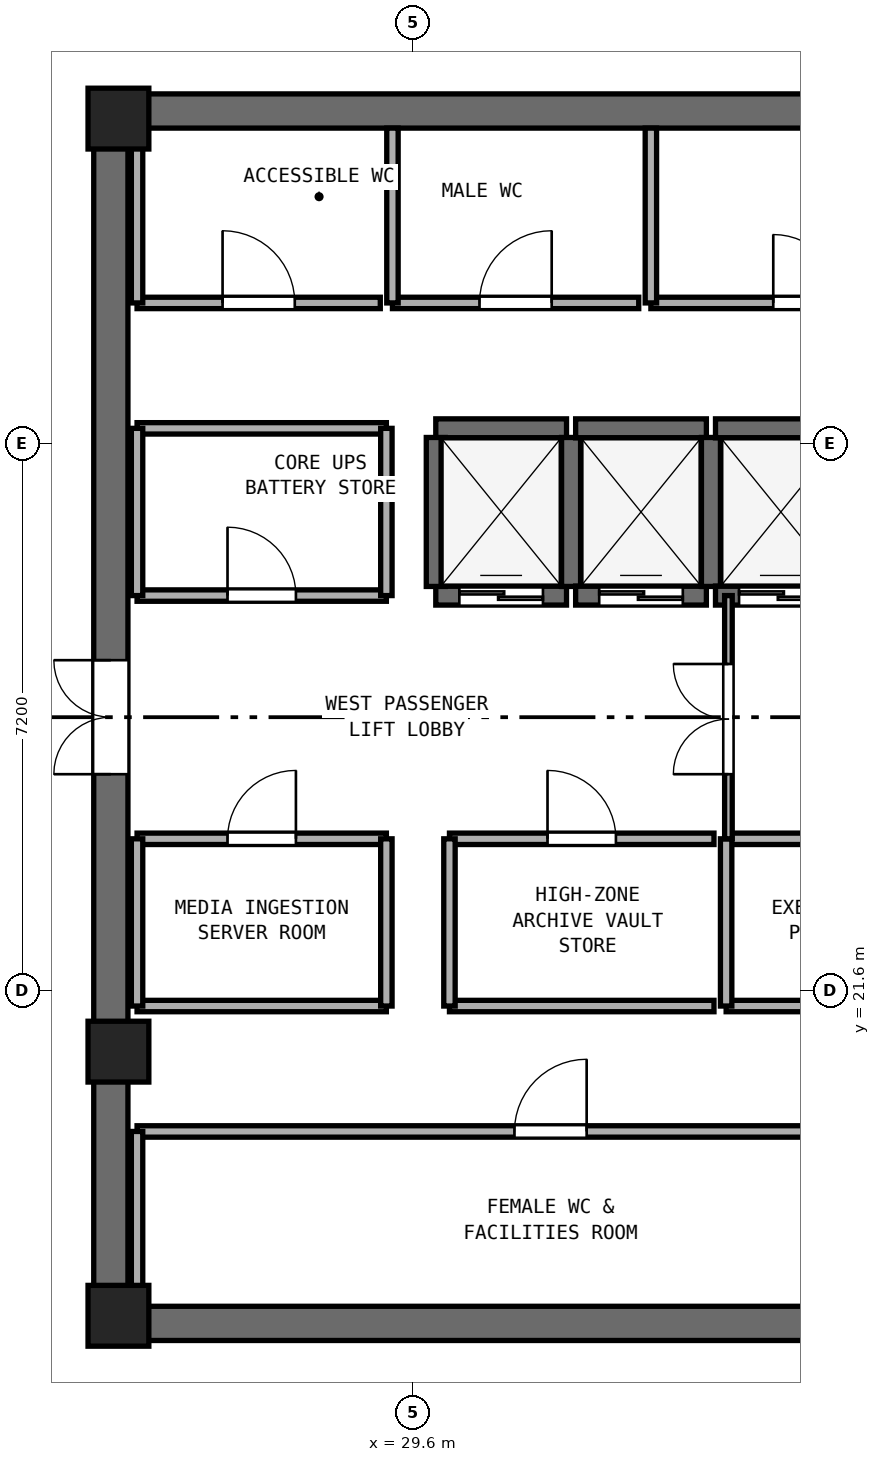
"""IFC4 building model, lengths in metres.
Left out: names, types, materials, properties, quantities, classifications, styles, units other than length and angle.
Written with IfcOpenShell. Run it as: python <this file> out.ifc"""

import sys

from ifc_helpers import new_model, si_unit, direction, frame, frame_2d, origin, origin_2d, place, context, subcontext, project, spatial, rectangle, extrude, element, fill, save


model = new_model("IFC4")
c1 = context("Model", 3, precision=1e-05, world=origin(), true_north=direction((0.0, 1.0)))
c2 = subcontext(c1, "Body", "Model", "MODEL_VIEW")
j1 = project(units=[si_unit("LENGTHUNIT", "METRE"), si_unit("PLANEANGLEUNIT", "RADIAN")], contexts=[c1])
p1 = place(None, origin())
s1 = spatial("IfcSite", under=j1, at=p1, CompositionType="ELEMENT")
p2 = place(p1, origin())
s2 = spatial("IfcBuilding", under=s1, at=p2, CompositionType="ELEMENT")
p3 = place(p2, frame((0.0, 0.0, 251.6)))
s3 = spatial("IfcBuildingStorey", under=s2, at=p3, CompositionType="ELEMENT", Elevation=251.6)
for number, where, z_axis, x_axis in (
    (1, (25.4, 17.225, 0.0), (0.0, 0.0, 1.0), (1.0, 0.0, 0.0)),
    (2, (25.4, 33.175, 0.0), (0.0, 0.0, 1.0), (1.0, 0.0, 0.0)),
):
    element("IfcWall", number, at=place(p3, frame(where, z_axis=z_axis, x_axis=x_axis)), inside=s3, PredefinedType="SHEAR", context=c2, shape_type="SweptSolid", body=[
        extrude(rectangle(XDim=23.2, YDim=0.45, at=frame_2d((11.6, 0.0))), origin(), (0.0, 0.0, 1.0), 3.51),
    ])
p4 = place(p3, frame((25.625, 17.45, 0.0), z_axis=(0.0, 0.0, 1.0), x_axis=(0.0, 1.0, 0.0)))
e3 = element("IfcWall", 3, at=p4, inside=s3, PredefinedType="SHEAR", context=c2, shape_type="SweptSolid", body=[
    extrude(rectangle(XDim=15.5, YDim=0.45, at=frame_2d((7.75, 0.0))), origin(), (0.0, 0.0, 1.0), 3.51),
])
p5 = place(p4, frame((7.0, 0.0, 0.0)))
e4 = element("IfcOpeningElement", 4, at=p5, cuts=e3, PredefinedType="OPENING", context=c2, shape_type="SweptSolid", body=[
    extrude(rectangle(XDim=1.5, YDim=2.15, at=frame_2d((0.75, 1.075))), frame((0.0, 0.235, 0.0), z_axis=(0.0, -1.0, 0.0), x_axis=(1.0, 0.0, 0.0)), (0.0, 0.0, 1.0), 0.47),
])
for number, where, z_axis, x_axis in (
    (5, (25.725, 17.325, 0.0), (0.0, 0.0, 1.0), (1.0, 0.0, 0.0)),
    (6, (25.725, 33.075, 0.0), (0.0, 0.0, 1.0), (1.0, 0.0, 0.0)),
    (7, (25.725, 20.8, 0.0), (0.0, 0.0, 1.0), (1.0, 0.0, 0.0)),
):
    element("IfcColumn", number, at=place(p3, frame(where, z_axis=z_axis, x_axis=x_axis)), inside=s3, PredefinedType="PILASTER", context=c2, shape_type="SweptSolid", body=[
        extrude(rectangle(XDim=0.8, YDim=0.8, at=origin_2d()), origin(), (0.0, 0.0, 1.0), 3.8),
    ])
p6 = place(p3, frame((29.9, 26.8, 0.0), z_axis=(0.0, 0.0, 1.0), x_axis=(1.0, 0.0, 0.0)))
e8 = element("IfcWall", 8, at=p6, inside=s3, PredefinedType="SHEAR", context=c2, shape_type="SweptSolid", body=[
    extrude(rectangle(XDim=1.72, YDim=0.25, at=frame_2d((0.86, 0.0))), origin(), (0.0, 0.0, 1.0), 3.51),
])
p7 = place(p6, frame((0.31, 0.0, 0.0)))
e9 = element("IfcOpeningElement", 9, at=p7, cuts=e8, PredefinedType="OPENING", context=c2, shape_type="SweptSolid", body=[
    extrude(rectangle(XDim=1.1, YDim=2.15, at=frame_2d((0.55, 1.075))), frame((0.0, 0.135, 0.0), z_axis=(0.0, -1.0, 0.0), x_axis=(1.0, 0.0, 0.0)), (0.0, 0.0, 1.0), 0.27),
])
p8 = place(p3, frame((29.9, 29.0, 0.0), z_axis=(0.0, 0.0, 1.0), x_axis=(1.0, 0.0, 0.0)))
e10 = element("IfcWall", 10, at=p8, inside=s3, PredefinedType="SHEAR", context=c2, shape_type="SweptSolid", body=[
    extrude(rectangle(XDim=1.72, YDim=0.25, at=frame_2d((0.86, 0.0))), origin(), (0.0, 0.0, 1.0), 3.51),
])
for number, where, z_axis, x_axis in (
    (11, (29.9, 26.92, 0.0), (0.0, 0.0, 1.0), (0.0, 1.0, 0.0)),
    (12, (31.68, 26.92, 0.0), (0.0, 0.0, 1.0), (0.0, 1.0, 0.0)),
):
    element("IfcWall", number, at=place(p3, frame(where, z_axis=z_axis, x_axis=x_axis)), inside=s3, PredefinedType="SHEAR", context=c2, shape_type="SweptSolid", body=[
        extrude(rectangle(XDim=1.96, YDim=0.25, at=frame_2d((0.98, 0.0))), origin(), (0.0, 0.0, 1.0), 3.51),
    ])
p9 = place(p3, frame((31.74, 26.8, 0.0), z_axis=(0.0, 0.0, 1.0), x_axis=(1.0, 0.0, 0.0)))
e13 = element("IfcWall", 13, at=p9, inside=s3, PredefinedType="SHEAR", context=c2, shape_type="SweptSolid", body=[
    extrude(rectangle(XDim=1.72, YDim=0.25, at=frame_2d((0.86, 0.0))), origin(), (0.0, 0.0, 1.0), 3.51),
])
p10 = place(p9, frame((0.31, 0.0, 0.0)))
e14 = element("IfcOpeningElement", 14, at=p10, cuts=e13, PredefinedType="OPENING", context=c2, shape_type="SweptSolid", body=[
    extrude(rectangle(XDim=1.1, YDim=2.15, at=frame_2d((0.55, 1.075))), frame((0.0, 0.135, 0.0), z_axis=(0.0, -1.0, 0.0), x_axis=(1.0, 0.0, 0.0)), (0.0, 0.0, 1.0), 0.27),
])
p11 = place(p3, frame((31.74, 29.0, 0.0), z_axis=(0.0, 0.0, 1.0), x_axis=(1.0, 0.0, 0.0)))
e15 = element("IfcWall", 15, at=p11, inside=s3, PredefinedType="SHEAR", context=c2, shape_type="SweptSolid", body=[
    extrude(rectangle(XDim=1.72, YDim=0.25, at=frame_2d((0.86, 0.0))), origin(), (0.0, 0.0, 1.0), 3.51),
])
p12 = place(p3, frame((33.52, 26.92, 0.0), z_axis=(0.0, 0.0, 1.0), x_axis=(0.0, 1.0, 0.0)))
e16 = element("IfcWall", 16, at=p12, inside=s3, PredefinedType="SHEAR", context=c2, shape_type="SweptSolid", body=[
    extrude(rectangle(XDim=1.96, YDim=0.25, at=frame_2d((0.98, 0.0))), origin(), (0.0, 0.0, 1.0), 3.51),
])
p13 = place(p3, frame((33.58, 26.8, 0.0), z_axis=(0.0, 0.0, 1.0), x_axis=(1.0, 0.0, 0.0)))
e17 = element("IfcWall", 17, at=p13, inside=s3, PredefinedType="SHEAR", context=c2, shape_type="SweptSolid", body=[
    extrude(rectangle(XDim=1.72, YDim=0.25, at=frame_2d((0.86, 0.0))), origin(), (0.0, 0.0, 1.0), 3.51),
])
p14 = place(p13, frame((0.31, 0.0, 0.0)))
e18 = element("IfcOpeningElement", 18, at=p14, cuts=e17, PredefinedType="OPENING", context=c2, shape_type="SweptSolid", body=[
    extrude(rectangle(XDim=1.1, YDim=2.15, at=frame_2d((0.55, 1.075))), frame((0.0, 0.135, 0.0), z_axis=(0.0, -1.0, 0.0), x_axis=(1.0, 0.0, 0.0)), (0.0, 0.0, 1.0), 0.27),
])
p15 = place(p3, frame((33.58, 29.0, 0.0), z_axis=(0.0, 0.0, 1.0), x_axis=(1.0, 0.0, 0.0)))
e19 = element("IfcWall", 19, at=p15, inside=s3, PredefinedType="SHEAR", context=c2, shape_type="SweptSolid", body=[
    extrude(rectangle(XDim=1.72, YDim=0.25, at=frame_2d((0.86, 0.0))), origin(), (0.0, 0.0, 1.0), 3.51),
])
p16 = place(p3, frame((25.97, 30.65, 0.0), z_axis=(0.0, 0.0, 1.0), x_axis=(1.0, 0.0, 0.0)))
e20 = element("IfcWall", 20, at=p16, inside=s3, PredefinedType="PARTITIONING", context=c2, shape_type="SweptSolid", body=[
    extrude(rectangle(XDim=3.2, YDim=0.15, at=frame_2d((1.6, 0.0))), origin(), (0.0, 0.0, 1.0), 3.51),
])
p17 = place(p16, frame((1.125, 0.0, 0.0)))
e21 = element("IfcOpeningElement", 21, at=p17, cuts=e20, PredefinedType="OPENING", context=c2, shape_type="SweptSolid", body=[
    extrude(rectangle(XDim=0.95, YDim=2.1, at=frame_2d((0.475, 1.05))), frame((0.0, 0.085, 0.0), z_axis=(0.0, -1.0, 0.0), x_axis=(1.0, 0.0, 0.0)), (0.0, 0.0, 1.0), 0.17),
])
p18 = place(p3, frame((25.97, 30.65, 0.0), z_axis=(0.0, 0.0, 1.0), x_axis=(0.0, 1.0, 0.0)))
e22 = element("IfcWall", 22, at=p18, inside=s3, PredefinedType="PARTITIONING", context=c2, shape_type="SweptSolid", body=[
    extrude(rectangle(XDim=2.3, YDim=0.15, at=frame_2d((1.15, 0.0))), origin(), (0.0, 0.0, 1.0), 2.61),
])
p19 = place(p3, frame((29.33, 30.65, 0.0), z_axis=(0.0, 0.0, 1.0), x_axis=(1.0, 0.0, 0.0)))
e23 = element("IfcWall", 23, at=p19, inside=s3, PredefinedType="PARTITIONING", context=c2, shape_type="SweptSolid", body=[
    extrude(rectangle(XDim=3.24, YDim=0.15, at=frame_2d((1.62, 0.0))), origin(), (0.0, 0.0, 1.0), 3.51),
])
p20 = place(p19, frame((1.145, 0.0, 0.0)))
e24 = element("IfcOpeningElement", 24, at=p20, cuts=e23, PredefinedType="OPENING", context=c2, shape_type="SweptSolid", body=[
    extrude(rectangle(XDim=0.95, YDim=2.1, at=frame_2d((0.475, 1.05))), frame((0.0, 0.085, 0.0), z_axis=(0.0, -1.0, 0.0), x_axis=(1.0, 0.0, 0.0)), (0.0, 0.0, 1.0), 0.17),
])
p21 = place(p3, frame((29.33, 30.65, 0.0), z_axis=(0.0, 0.0, 1.0), x_axis=(0.0, 1.0, 0.0)))
e25 = element("IfcWall", 25, at=p21, inside=s3, PredefinedType="PARTITIONING", context=c2, shape_type="SweptSolid", body=[
    extrude(rectangle(XDim=2.3, YDim=0.15, at=frame_2d((1.15, 0.0))), origin(), (0.0, 0.0, 1.0), 3.51),
])
p22 = place(p3, frame((32.73, 30.65, 0.0), z_axis=(0.0, 0.0, 1.0), x_axis=(1.0, 0.0, 0.0)))
e26 = element("IfcWall", 26, at=p22, inside=s3, PredefinedType="PARTITIONING", context=c2, shape_type="SweptSolid", body=[
    extrude(rectangle(XDim=4.12, YDim=0.15, at=frame_2d((2.06, 0.0))), origin(), (0.0, 0.0, 1.0), 3.51),
])
p23 = place(p22, frame((1.61, 0.0, 0.0)))
e27 = element("IfcOpeningElement", 27, at=p23, cuts=e26, PredefinedType="OPENING", context=c2, shape_type="SweptSolid", body=[
    extrude(rectangle(XDim=0.9, YDim=2.1, at=frame_2d((0.45, 1.05))), frame((0.0, 0.085, 0.0), z_axis=(0.0, -1.0, 0.0), x_axis=(1.0, 0.0, 0.0)), (0.0, 0.0, 1.0), 0.17),
])
p24 = place(p3, frame((32.73, 30.65, 0.0), z_axis=(0.0, 0.0, 1.0), x_axis=(0.0, 1.0, 0.0)))
e28 = element("IfcWall", 28, at=p24, inside=s3, PredefinedType="PARTITIONING", context=c2, shape_type="SweptSolid", body=[
    extrude(rectangle(XDim=2.3, YDim=0.15, at=frame_2d((1.15, 0.0))), origin(), (0.0, 0.0, 1.0), 3.51),
])
p25 = place(p3, frame((25.97, 19.75, 0.0), z_axis=(0.0, 0.0, 1.0), x_axis=(1.0, 0.0, 0.0)))
e29 = element("IfcWall", 29, at=p25, inside=s3, PredefinedType="PARTITIONING", context=c2, shape_type="SweptSolid", body=[
    extrude(rectangle(XDim=10.88, YDim=0.15, at=frame_2d((5.44, 0.0))), origin(), (0.0, 0.0, 1.0), 3.51),
])
p26 = place(p25, frame((4.965, 0.0, 0.0)))
e30 = element("IfcOpeningElement", 30, at=p26, cuts=e29, PredefinedType="OPENING", context=c2, shape_type="SweptSolid", body=[
    extrude(rectangle(XDim=0.95, YDim=2.1, at=frame_2d((0.475, 1.05))), frame((0.0, 0.085, 0.0), z_axis=(0.0, -1.0, 0.0), x_axis=(1.0, 0.0, 0.0)), (0.0, 0.0, 1.0), 0.17),
])
p27 = place(p3, frame((25.97, 17.45, 0.0), z_axis=(0.0, 0.0, 1.0), x_axis=(0.0, 1.0, 0.0)))
e31 = element("IfcWall", 31, at=p27, inside=s3, PredefinedType="PARTITIONING", context=c2, shape_type="SweptSolid", body=[
    extrude(rectangle(XDim=2.3, YDim=0.15, at=frame_2d((1.15, 0.0))), origin(), (0.0, 0.0, 1.0), 2.61),
])
p28 = place(p3, frame((25.97, 26.8, 0.0), z_axis=(0.0, 0.0, 1.0), x_axis=(1.0, 0.0, 0.0)))
e32 = element("IfcWall", 32, at=p28, inside=s3, PredefinedType="PARTITIONING", context=c2, shape_type="SweptSolid", body=[
    extrude(rectangle(XDim=3.28, YDim=0.15, at=frame_2d((1.64, 0.0))), origin(), (0.0, 0.0, 1.0), 3.51),
])
p29 = place(p28, frame((1.19, 0.0, 0.0)))
e33 = element("IfcOpeningElement", 33, at=p29, cuts=e32, PredefinedType="OPENING", context=c2, shape_type="SweptSolid", body=[
    extrude(rectangle(XDim=0.9, YDim=2.1, at=frame_2d((0.45, 1.05))), frame((0.0, 0.085, 0.0), z_axis=(0.0, -1.0, 0.0), x_axis=(1.0, 0.0, 0.0)), (0.0, 0.0, 1.0), 0.17),
])
p30 = place(p3, frame((25.97, 29.0, 0.0), z_axis=(0.0, 0.0, 1.0), x_axis=(1.0, 0.0, 0.0)))
e34 = element("IfcWall", 34, at=p30, inside=s3, PredefinedType="PARTITIONING", context=c2, shape_type="SweptSolid", body=[
    extrude(rectangle(XDim=3.28, YDim=0.15, at=frame_2d((1.64, 0.0))), origin(), (0.0, 0.0, 1.0), 3.51),
])
p31 = place(p3, frame((25.97, 26.8, 0.0), z_axis=(0.0, 0.0, 1.0), x_axis=(0.0, 1.0, 0.0)))
e35 = element("IfcWall", 35, at=p31, inside=s3, PredefinedType="PARTITIONING", context=c2, shape_type="SweptSolid", body=[
    extrude(rectangle(XDim=2.2, YDim=0.15, at=frame_2d((1.1, 0.0))), origin(), (0.0, 0.0, 1.0), 2.61),
])
p32 = place(p3, frame((29.25, 26.8, 0.0), z_axis=(0.0, 0.0, 1.0), x_axis=(0.0, 1.0, 0.0)))
e36 = element("IfcWall", 36, at=p32, inside=s3, PredefinedType="PARTITIONING", context=c2, shape_type="SweptSolid", body=[
    extrude(rectangle(XDim=2.2, YDim=0.15, at=frame_2d((1.1, 0.0))), origin(), (0.0, 0.0, 1.0), 3.51),
])
p33 = place(p3, frame((25.97, 21.4, 0.0), z_axis=(0.0, 0.0, 1.0), x_axis=(1.0, 0.0, 0.0)))
e37 = element("IfcWall", 37, at=p33, inside=s3, PredefinedType="PARTITIONING", context=c2, shape_type="SweptSolid", body=[
    extrude(rectangle(XDim=3.28, YDim=0.15, at=frame_2d((1.64, 0.0))), origin(), (0.0, 0.0, 1.0), 3.51),
])
p34 = place(p3, frame((25.97, 23.6, 0.0), z_axis=(0.0, 0.0, 1.0), x_axis=(1.0, 0.0, 0.0)))
e38 = element("IfcWall", 38, at=p34, inside=s3, PredefinedType="PARTITIONING", context=c2, shape_type="SweptSolid", body=[
    extrude(rectangle(XDim=3.28, YDim=0.15, at=frame_2d((1.64, 0.0))), origin(), (0.0, 0.0, 1.0), 3.51),
])
p35 = place(p34, frame((1.19, 0.0, 0.0)))
e39 = element("IfcOpeningElement", 39, at=p35, cuts=e38, PredefinedType="OPENING", context=c2, shape_type="SweptSolid", body=[
    extrude(rectangle(XDim=0.9, YDim=2.1, at=frame_2d((0.45, 1.05))), frame((0.0, 0.085, 0.0), z_axis=(0.0, -1.0, 0.0), x_axis=(1.0, 0.0, 0.0)), (0.0, 0.0, 1.0), 0.17),
])
p36 = place(p3, frame((25.97, 21.4, 0.0), z_axis=(0.0, 0.0, 1.0), x_axis=(0.0, 1.0, 0.0)))
e40 = element("IfcWall", 40, at=p36, inside=s3, PredefinedType="PARTITIONING", context=c2, shape_type="SweptSolid", body=[
    extrude(rectangle(XDim=2.2, YDim=0.15, at=frame_2d((1.1, 0.0))), origin(), (0.0, 0.0, 1.0), 2.61),
])
p37 = place(p3, frame((29.25, 21.4, 0.0), z_axis=(0.0, 0.0, 1.0), x_axis=(0.0, 1.0, 0.0)))
e41 = element("IfcWall", 41, at=p37, inside=s3, PredefinedType="PARTITIONING", context=c2, shape_type="SweptSolid", body=[
    extrude(rectangle(XDim=2.2, YDim=0.15, at=frame_2d((1.1, 0.0))), origin(), (0.0, 0.0, 1.0), 3.51),
])
p38 = place(p3, frame((30.08, 21.4, 0.0), z_axis=(0.0, 0.0, 1.0), x_axis=(1.0, 0.0, 0.0)))
e42 = element("IfcWall", 42, at=p38, inside=s3, PredefinedType="PARTITIONING", context=c2, shape_type="SweptSolid", body=[
    extrude(rectangle(XDim=3.48, YDim=0.15, at=frame_2d((1.74, 0.0))), origin(), (0.0, 0.0, 1.0), 3.51),
])
p39 = place(p3, frame((30.08, 23.6, 0.0), z_axis=(0.0, 0.0, 1.0), x_axis=(1.0, 0.0, 0.0)))
e43 = element("IfcWall", 43, at=p39, inside=s3, PredefinedType="PARTITIONING", context=c2, shape_type="SweptSolid", body=[
    extrude(rectangle(XDim=3.48, YDim=0.15, at=frame_2d((1.74, 0.0))), origin(), (0.0, 0.0, 1.0), 3.51),
])
p40 = place(p39, frame((1.29, 0.0, 0.0)))
e44 = element("IfcOpeningElement", 44, at=p40, cuts=e43, PredefinedType="OPENING", context=c2, shape_type="SweptSolid", body=[
    extrude(rectangle(XDim=0.9, YDim=2.1, at=frame_2d((0.45, 1.05))), frame((0.0, 0.085, 0.0), z_axis=(0.0, -1.0, 0.0), x_axis=(1.0, 0.0, 0.0)), (0.0, 0.0, 1.0), 0.17),
])
p41 = place(p3, frame((30.08, 21.4, 0.0), z_axis=(0.0, 0.0, 1.0), x_axis=(0.0, 1.0, 0.0)))
e45 = element("IfcWall", 45, at=p41, inside=s3, PredefinedType="PARTITIONING", context=c2, shape_type="SweptSolid", body=[
    extrude(rectangle(XDim=2.2, YDim=0.15, at=frame_2d((1.1, 0.0))), origin(), (0.0, 0.0, 1.0), 3.51),
])
p42 = place(p3, frame((33.72, 21.4, 0.0), z_axis=(0.0, 0.0, 1.0), x_axis=(1.0, 0.0, 0.0)))
e46 = element("IfcWall", 46, at=p42, inside=s3, PredefinedType="PARTITIONING", context=c2, shape_type="SweptSolid", body=[
    extrude(rectangle(XDim=3.48, YDim=0.15, at=frame_2d((1.74, 0.0))), origin(), (0.0, 0.0, 1.0), 3.51),
])
p43 = place(p3, frame((33.72, 23.6, 0.0), z_axis=(0.0, 0.0, 1.0), x_axis=(1.0, 0.0, 0.0)))
e47 = element("IfcWall", 47, at=p43, inside=s3, PredefinedType="PARTITIONING", context=c2, shape_type="SweptSolid", body=[
    extrude(rectangle(XDim=3.48, YDim=0.15, at=frame_2d((1.74, 0.0))), origin(), (0.0, 0.0, 1.0), 3.51),
])
p44 = place(p43, frame((1.29, 0.0, 0.0)))
e48 = element("IfcOpeningElement", 48, at=p44, cuts=e47, PredefinedType="OPENING", context=c2, shape_type="SweptSolid", body=[
    extrude(rectangle(XDim=0.9, YDim=2.1, at=frame_2d((0.45, 1.05))), frame((0.0, 0.085, 0.0), z_axis=(0.0, -1.0, 0.0), x_axis=(1.0, 0.0, 0.0)), (0.0, 0.0, 1.0), 0.17),
])
p45 = place(p3, frame((33.72, 21.4, 0.0), z_axis=(0.0, 0.0, 1.0), x_axis=(0.0, 1.0, 0.0)))
e49 = element("IfcWall", 49, at=p45, inside=s3, PredefinedType="PARTITIONING", context=c2, shape_type="SweptSolid", body=[
    extrude(rectangle(XDim=2.2, YDim=0.15, at=frame_2d((1.1, 0.0))), origin(), (0.0, 0.0, 1.0), 3.51),
])
p46 = place(p3, frame((33.75, 23.6, 0.0), z_axis=(0.0, 0.0, 1.0), x_axis=(0.0, 1.0, 0.0)))
e50 = element("IfcWall", 50, at=p46, inside=s3, PredefinedType="PARTITIONING", context=c2, shape_type="SweptSolid", body=[
    extrude(rectangle(XDim=3.2, YDim=0.1, at=frame_2d((1.6, 0.0))), origin(), (0.0, 0.0, 1.0), 3.51),
])
p47 = place(p46, frame((0.85, 0.0, 0.0)))
e51 = element("IfcOpeningElement", 51, at=p47, cuts=e50, PredefinedType="OPENING", context=c2, shape_type="SweptSolid", body=[
    extrude(rectangle(XDim=1.45, YDim=2.12, at=frame_2d((0.725, 1.06))), frame((0.0, 0.06, 0.0), z_axis=(0.0, -1.0, 0.0), x_axis=(1.0, 0.0, 0.0)), (0.0, 0.0, 1.0), 0.12),
])
p48 = place(p7, origin())
e52 = element("IfcDoor", 52, at=p48, inside=s3, OperationType="DOUBLE_DOOR_SLIDING", PredefinedType="DOOR", context=c2, shape_type="SweptSolid", body=[
    extrude(rectangle(XDim=1.1, YDim=2.15, at=frame_2d((0.55, 1.075))), frame((0.0, 0.025, 0.0), z_axis=(0.0, -1.0, 0.0), x_axis=(1.0, 0.0, 0.0)), (0.0, 0.0, 1.0), 0.05),
])
fill(e9, e52)
p49 = place(p10, origin())
e53 = element("IfcDoor", 53, at=p49, inside=s3, OperationType="DOUBLE_DOOR_SLIDING", PredefinedType="DOOR", context=c2, shape_type="SweptSolid", body=[
    extrude(rectangle(XDim=1.1, YDim=2.15, at=frame_2d((0.55, 1.075))), frame((0.0, 0.025, 0.0), z_axis=(0.0, -1.0, 0.0), x_axis=(1.0, 0.0, 0.0)), (0.0, 0.0, 1.0), 0.05),
])
fill(e14, e53)
p50 = place(p14, origin())
e54 = element("IfcDoor", 54, at=p50, inside=s3, OperationType="DOUBLE_DOOR_SLIDING", PredefinedType="DOOR", context=c2, shape_type="SweptSolid", body=[
    extrude(rectangle(XDim=1.1, YDim=2.15, at=frame_2d((0.55, 1.075))), frame((0.0, 0.025, 0.0), z_axis=(0.0, -1.0, 0.0), x_axis=(1.0, 0.0, 0.0)), (0.0, 0.0, 1.0), 0.05),
])
fill(e18, e54)
p51 = place(p5, origin())
e55 = element("IfcDoor", 55, at=p51, inside=s3, OperationType="DOUBLE_DOOR_SINGLE_SWING", PredefinedType="DOOR", context=c2, shape_type="SweptSolid", body=[
    extrude(rectangle(XDim=1.5, YDim=2.15, at=frame_2d((0.75, 1.075))), frame((0.0, 0.025, 0.0), z_axis=(0.0, -1.0, 0.0), x_axis=(1.0, 0.0, 0.0)), (0.0, 0.0, 1.0), 0.05),
])
fill(e4, e55)
p52 = place(p17, origin())
e56 = element("IfcDoor", 56, at=p52, inside=s3, OperationType="SINGLE_SWING_LEFT", PredefinedType="DOOR", context=c2, shape_type="SweptSolid", body=[
    extrude(rectangle(XDim=0.95, YDim=2.1, at=frame_2d((0.475, 1.05))), frame((0.0, 0.025, 0.0), z_axis=(0.0, -1.0, 0.0), x_axis=(1.0, 0.0, 0.0)), (0.0, 0.0, 1.0), 0.05),
])
fill(e21, e56)
p53 = place(p20, origin())
e57 = element("IfcDoor", 57, at=p53, inside=s3, OperationType="SINGLE_SWING_RIGHT", PredefinedType="DOOR", context=c2, shape_type="SweptSolid", body=[
    extrude(rectangle(XDim=0.95, YDim=2.1, at=frame_2d((0.475, 1.05))), frame((0.0, 0.025, 0.0), z_axis=(0.0, -1.0, 0.0), x_axis=(1.0, 0.0, 0.0)), (0.0, 0.0, 1.0), 0.05),
])
fill(e24, e57)
p54 = place(p23, origin())
e58 = element("IfcDoor", 58, at=p54, inside=s3, OperationType="SINGLE_SWING_LEFT", PredefinedType="DOOR", context=c2, shape_type="SweptSolid", body=[
    extrude(rectangle(XDim=0.9, YDim=2.1, at=frame_2d((0.45, 1.05))), frame((0.0, 0.025, 0.0), z_axis=(0.0, -1.0, 0.0), x_axis=(1.0, 0.0, 0.0)), (0.0, 0.0, 1.0), 0.05),
])
fill(e27, e58)
p55 = place(p26, origin())
e59 = element("IfcDoor", 59, at=p55, inside=s3, OperationType="SINGLE_SWING_RIGHT", PredefinedType="DOOR", context=c2, shape_type="SweptSolid", body=[
    extrude(rectangle(XDim=0.95, YDim=2.1, at=frame_2d((0.475, 1.05))), frame((0.0, 0.025, 0.0), z_axis=(0.0, -1.0, 0.0), x_axis=(1.0, 0.0, 0.0)), (0.0, 0.0, 1.0), 0.05),
])
fill(e30, e59)
p56 = place(p29, origin())
e60 = element("IfcDoor", 60, at=p56, inside=s3, OperationType="SINGLE_SWING_LEFT", PredefinedType="DOOR", context=c2, shape_type="SweptSolid", body=[
    extrude(rectangle(XDim=0.9, YDim=2.1, at=frame_2d((0.45, 1.05))), frame((0.0, 0.025, 0.0), z_axis=(0.0, -1.0, 0.0), x_axis=(1.0, 0.0, 0.0)), (0.0, 0.0, 1.0), 0.05),
])
fill(e33, e60)
p57 = place(p35, origin())
e61 = element("IfcDoor", 61, at=p57, inside=s3, OperationType="SINGLE_SWING_RIGHT", PredefinedType="DOOR", context=c2, shape_type="SweptSolid", body=[
    extrude(rectangle(XDim=0.9, YDim=2.1, at=frame_2d((0.45, 1.05))), frame((0.0, 0.025, 0.0), z_axis=(0.0, -1.0, 0.0), x_axis=(1.0, 0.0, 0.0)), (0.0, 0.0, 1.0), 0.05),
])
fill(e39, e61)
p58 = place(p40, origin())
e62 = element("IfcDoor", 62, at=p58, inside=s3, OperationType="SINGLE_SWING_LEFT", PredefinedType="DOOR", context=c2, shape_type="SweptSolid", body=[
    extrude(rectangle(XDim=0.9, YDim=2.1, at=frame_2d((0.45, 1.05))), frame((0.0, 0.025, 0.0), z_axis=(0.0, -1.0, 0.0), x_axis=(1.0, 0.0, 0.0)), (0.0, 0.0, 1.0), 0.05),
])
fill(e44, e62)
p59 = place(p47, origin())
e63 = element("IfcDoor", 63, at=p59, inside=s3, OperationType="DOUBLE_DOOR_SINGLE_SWING", PredefinedType="DOOR", context=c2, shape_type="SweptSolid", body=[
    extrude(rectangle(XDim=1.45, YDim=2.12, at=frame_2d((0.725, 1.06))), frame((0.0, 0.025, 0.0), z_axis=(0.0, -1.0, 0.0), x_axis=(1.0, 0.0, 0.0)), (0.0, 0.0, 1.0), 0.05),
])
fill(e51, e63)
save(model, sys.argv[1])
